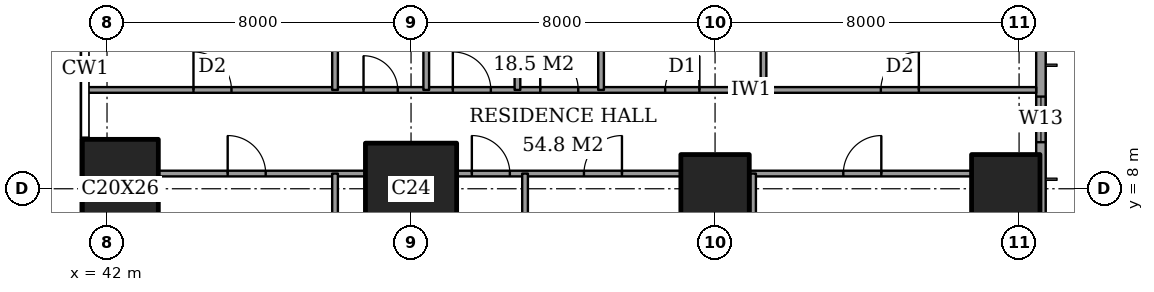
"""IFC4 building model, lengths in metres.
Left out: names, types, materials, properties, quantities, classifications, styles, units other than length and angle.
Written with IfcOpenShell. Run it as: python <this file> out.ifc"""

import sys

from ifc_helpers import new_model, si_unit, direction, frame, frame_2d, origin, origin_2d, place, context, subcontext, project, spatial, rectangle, extrude, element, fill, save


model = new_model("IFC4")
c1 = context("Model", 3, precision=1e-05, world=origin(), true_north=direction((0.0, 1.0)))
c2 = subcontext(c1, "Body", "Model", "MODEL_VIEW")
j1 = project(units=[si_unit("LENGTHUNIT", "METRE"), si_unit("PLANEANGLEUNIT", "RADIAN")], contexts=[c1])
p1 = place(None, origin())
s1 = spatial("IfcSite", under=j1, at=p1, CompositionType="ELEMENT")
p2 = place(p1, origin())
s2 = spatial("IfcBuilding", under=s1, at=p2, CompositionType="ELEMENT")
p3 = place(p2, frame((0.0, 0.0, 196.6)))
s3 = spatial("IfcBuildingStorey", under=s2, at=p3, CompositionType="ELEMENT", Elevation=196.6)
p4 = place(p3, frame((42.35, 8.0, 0.0), z_axis=(0.0, 0.0, 1.0), x_axis=(1.0, 0.0, 0.0)))
e1 = element("IfcColumn", 1, at=p4, inside=s3, PredefinedType="COLUMN", context=c2, shape_type="SweptSolid", body=[
    extrude(rectangle(XDim=2.0, YDim=2.6, at=origin_2d()), origin(), (0.0, 0.0, 1.0), 3.6),
])
p5 = place(p3, frame((50.0, 8.0, 0.0), z_axis=(0.0, 0.0, 1.0), x_axis=(1.0, 0.0, 0.0)))
e2 = element("IfcColumn", 2, at=p5, inside=s3, PredefinedType="COLUMN", context=c2, shape_type="SweptSolid", body=[
    extrude(rectangle(XDim=2.4, YDim=2.4, at=origin_2d()), origin(), (0.0, 0.0, 1.0), 3.6),
])
for number, where, z_axis, x_axis in (
    (3, (58.0, 8.0, 0.0), (0.0, 0.0, 1.0), (1.0, 0.0, 0.0)),
    (4, (65.65, 8.0, 0.0), (0.0, 0.0, 1.0), (1.0, 0.0, 0.0)),
):
    element("IfcColumn", number, at=place(p3, frame(where, z_axis=z_axis, x_axis=x_axis)), inside=s3, PredefinedType="COLUMN", context=c2, shape_type="SweptSolid", body=[
        extrude(rectangle(XDim=1.8, YDim=1.8, at=origin_2d()), origin(), (0.0, 0.0, 1.0), 3.6),
    ])
p6 = place(p3, frame((66.575, 3.175, 0.0), z_axis=(0.0, 0.0, 1.0), x_axis=(0.0, 1.0, 0.0)))
e5 = element("IfcWall", 5, at=p6, inside=s3, PredefinedType="SOLIDWALL", context=c2, shape_type="SweptSolid", body=[
    extrude(rectangle(XDim=41.65, YDim=0.25, at=frame_2d((20.825, 0.0))), origin(), (0.0, 0.0, 1.0), 3.6),
])
p7 = place(p6, frame((0.825, 0.0, 0.2)))
e6 = element("IfcOpeningElement", 6, at=p7, cuts=e5, PredefinedType="OPENING", context=c2, shape_type="SweptSolid", body=[
    extrude(rectangle(XDim=2.4, YDim=2.4, at=frame_2d((1.2, 1.2))), frame((0.0, 0.135, 0.0), z_axis=(0.0, -1.0, 0.0), x_axis=(1.0, 0.0, 0.0)), (0.0, 0.0, 1.0), 0.27),
])
p8 = place(p6, frame((6.05, 0.0, 0.2)))
e7 = element("IfcOpeningElement", 7, at=p8, cuts=e5, PredefinedType="OPENING", context=c2, shape_type="SweptSolid", body=[
    extrude(rectangle(XDim=1.2, YDim=2.4, at=frame_2d((0.6, 1.2))), frame((0.0, 0.135, 0.0), z_axis=(0.0, -1.0, 0.0), x_axis=(1.0, 0.0, 0.0)), (0.0, 0.0, 1.0), 0.27),
])
p9 = place(p6, frame((8.475, 0.0, 0.2)))
e8 = element("IfcOpeningElement", 8, at=p9, cuts=e5, PredefinedType="OPENING", context=c2, shape_type="SweptSolid", body=[
    extrude(rectangle(XDim=2.4, YDim=2.4, at=frame_2d((1.2, 1.2))), frame((0.0, 0.135, 0.0), z_axis=(0.0, -1.0, 0.0), x_axis=(1.0, 0.0, 0.0)), (0.0, 0.0, 1.0), 0.27),
])
p10 = place(p6, frame((15.675, 0.0, 0.2)))
e9 = element("IfcOpeningElement", 9, at=p10, cuts=e5, PredefinedType="OPENING", context=c2, shape_type="SweptSolid", body=[
    extrude(rectangle(XDim=2.4, YDim=2.4, at=frame_2d((1.2, 1.2))), frame((0.0, 0.135, 0.0), z_axis=(0.0, -1.0, 0.0), x_axis=(1.0, 0.0, 0.0)), (0.0, 0.0, 1.0), 0.27),
])
p11 = place(p6, frame((23.625, 0.0, 0.2)))
e10 = element("IfcOpeningElement", 10, at=p11, cuts=e5, PredefinedType="OPENING", context=c2, shape_type="SweptSolid", body=[
    extrude(rectangle(XDim=2.4, YDim=2.4, at=frame_2d((1.2, 1.2))), frame((0.0, 0.135, 0.0), z_axis=(0.0, -1.0, 0.0), x_axis=(1.0, 0.0, 0.0)), (0.0, 0.0, 1.0), 0.27),
])
p12 = place(p6, frame((30.775, 0.0, 0.2)))
e11 = element("IfcOpeningElement", 11, at=p12, cuts=e5, PredefinedType="OPENING", context=c2, shape_type="SweptSolid", body=[
    extrude(rectangle(XDim=2.4, YDim=2.4, at=frame_2d((1.2, 1.2))), frame((0.0, 0.135, 0.0), z_axis=(0.0, -1.0, 0.0), x_axis=(1.0, 0.0, 0.0)), (0.0, 0.0, 1.0), 0.27),
])
p13 = place(p6, frame((34.55, 0.0, 0.2)))
e12 = element("IfcOpeningElement", 12, at=p13, cuts=e5, PredefinedType="OPENING", context=c2, shape_type="SweptSolid", body=[
    extrude(rectangle(XDim=1.2, YDim=2.4, at=frame_2d((0.6, 1.2))), frame((0.0, 0.135, 0.0), z_axis=(0.0, -1.0, 0.0), x_axis=(1.0, 0.0, 0.0)), (0.0, 0.0, 1.0), 0.27),
])
p14 = place(p6, frame((38.425, 0.0, 0.2)))
e13 = element("IfcOpeningElement", 13, at=p14, cuts=e5, PredefinedType="OPENING", context=c2, shape_type="SweptSolid", body=[
    extrude(rectangle(XDim=2.4, YDim=2.4, at=frame_2d((1.2, 1.2))), frame((0.0, 0.135, 0.0), z_axis=(0.0, -1.0, 0.0), x_axis=(1.0, 0.0, 0.0)), (0.0, 0.0, 1.0), 0.27),
])
p15 = place(p3, frame((43.35, 8.4, 0.0), z_axis=(0.0, 0.0, 1.0), x_axis=(1.0, 0.0, 0.0)))
e14 = element("IfcWall", 14, at=p15, inside=s3, PredefinedType="PARTITIONING", context=c2, shape_type="SweptSolid", body=[
    extrude(rectangle(XDim=5.45, YDim=0.15, at=frame_2d((2.725, 0.0))), origin(), (0.0, 0.0, 1.0), 3.35),
])
p16 = place(p15, frame((1.825, 0.0, 0.0)))
e15 = element("IfcOpeningElement", 15, at=p16, cuts=e14, PredefinedType="OPENING", context=c2, shape_type="SweptSolid", body=[
    extrude(rectangle(XDim=1.0, YDim=2.1, at=frame_2d((0.5, 1.05))), frame((0.0, 0.085, 0.0), z_axis=(0.0, -1.0, 0.0), x_axis=(1.0, 0.0, 0.0)), (0.0, 0.0, 1.0), 0.17),
])
p17 = place(p3, frame((51.2, 8.4, 0.0), z_axis=(0.0, 0.0, 1.0), x_axis=(1.0, 0.0, 0.0)))
e16 = element("IfcWall", 16, at=p17, inside=s3, PredefinedType="PARTITIONING", context=c2, shape_type="SweptSolid", body=[
    extrude(rectangle(XDim=5.9, YDim=0.15, at=frame_2d((2.95, 0.0))), origin(), (0.0, 0.0, 1.0), 3.35),
])
p18 = place(p17, frame((3.35, 0.0, 0.0)))
e17 = element("IfcOpeningElement", 17, at=p18, cuts=e16, PredefinedType="OPENING", context=c2, shape_type="SweptSolid", body=[
    extrude(rectangle(XDim=1.0, YDim=2.1, at=frame_2d((0.5, 1.05))), frame((0.0, 0.085, 0.0), z_axis=(0.0, -1.0, 0.0), x_axis=(1.0, 0.0, 0.0)), (0.0, 0.0, 1.0), 0.17),
])
p19 = place(p17, frame((0.4, 0.0, 0.0)))
e18 = element("IfcOpeningElement", 18, at=p19, cuts=e16, PredefinedType="OPENING", context=c2, shape_type="SweptSolid", body=[
    extrude(rectangle(XDim=1.0, YDim=2.1, at=frame_2d((0.5, 1.05))), frame((0.0, 0.085, 0.0), z_axis=(0.0, -1.0, 0.0), x_axis=(1.0, 0.0, 0.0)), (0.0, 0.0, 1.0), 0.17),
])
p20 = place(p3, frame((58.9, 8.4, 0.0), z_axis=(0.0, 0.0, 1.0), x_axis=(1.0, 0.0, 0.0)))
e19 = element("IfcWall", 19, at=p20, inside=s3, PredefinedType="PARTITIONING", context=c2, shape_type="SweptSolid", body=[
    extrude(rectangle(XDim=5.85, YDim=0.15, at=frame_2d((2.925, 0.0))), origin(), (0.0, 0.0, 1.0), 3.35),
])
p21 = place(p20, frame((2.475, 0.0, 0.0)))
e20 = element("IfcOpeningElement", 20, at=p21, cuts=e19, PredefinedType="OPENING", context=c2, shape_type="SweptSolid", body=[
    extrude(rectangle(XDim=1.0, YDim=2.1, at=frame_2d((0.5, 1.05))), frame((0.0, 0.085, 0.0), z_axis=(0.0, -1.0, 0.0), x_axis=(1.0, 0.0, 0.0)), (0.0, 0.0, 1.0), 0.17),
])
p22 = place(p3, frame((41.439, 10.6, 0.0), z_axis=(0.0, 0.0, 1.0), x_axis=(1.0, 0.0, 0.0)))
e21 = element("IfcWall", 21, at=p22, inside=s3, PredefinedType="PARTITIONING", context=c2, shape_type="SweptSolid", body=[
    extrude(rectangle(XDim=25.011, YDim=0.15, at=frame_2d((12.505, 0.0))), origin(), (0.0, 0.0, 1.0), 3.35),
])
p23 = place(p22, frame((11.961, 0.0, 0.0)))
e22 = element("IfcOpeningElement", 22, at=p23, cuts=e21, PredefinedType="OPENING", context=c2, shape_type="SweptSolid", body=[
    extrude(rectangle(XDim=1.0, YDim=2.1, at=frame_2d((0.5, 1.05))), frame((0.0, 0.085, 0.0), z_axis=(0.0, -1.0, 0.0), x_axis=(1.0, 0.0, 0.0)), (0.0, 0.0, 1.0), 0.17),
])
p24 = place(p22, frame((20.924, 0.0, 0.0)))
e23 = element("IfcOpeningElement", 23, at=p24, cuts=e21, PredefinedType="OPENING", context=c2, shape_type="SweptSolid", body=[
    extrude(rectangle(XDim=1.0, YDim=2.1, at=frame_2d((0.5, 1.05))), frame((0.0, 0.085, 0.0), z_axis=(0.0, -1.0, 0.0), x_axis=(1.0, 0.0, 0.0)), (0.0, 0.0, 1.0), 0.17),
])
p25 = place(p22, frame((15.249, 0.0, 0.0)))
e24 = element("IfcOpeningElement", 24, at=p25, cuts=e21, PredefinedType="OPENING", context=c2, shape_type="SweptSolid", body=[
    extrude(rectangle(XDim=0.9, YDim=2.1, at=frame_2d((0.45, 1.05))), frame((0.0, 0.085, 0.0), z_axis=(0.0, -1.0, 0.0), x_axis=(1.0, 0.0, 0.0)), (0.0, 0.0, 1.0), 0.17),
])
p26 = place(p22, frame((9.661, 0.0, 0.0)))
e25 = element("IfcOpeningElement", 25, at=p26, cuts=e21, PredefinedType="OPENING", context=c2, shape_type="SweptSolid", body=[
    extrude(rectangle(XDim=1.0, YDim=2.1, at=frame_2d((0.5, 1.05))), frame((0.0, 0.085, 0.0), z_axis=(0.0, -1.0, 0.0), x_axis=(1.0, 0.0, 0.0)), (0.0, 0.0, 1.0), 0.17),
])
p27 = place(p22, frame((7.311, 0.0, 0.0)))
e26 = element("IfcOpeningElement", 26, at=p27, cuts=e21, PredefinedType="OPENING", context=c2, shape_type="SweptSolid", body=[
    extrude(rectangle(XDim=0.9, YDim=2.1, at=frame_2d((0.45, 1.05))), frame((0.0, 0.085, 0.0), z_axis=(0.0, -1.0, 0.0), x_axis=(1.0, 0.0, 0.0)), (0.0, 0.0, 1.0), 0.17),
])
p28 = place(p22, frame((2.836, 0.0, 0.0)))
e27 = element("IfcOpeningElement", 27, at=p28, cuts=e21, PredefinedType="OPENING", context=c2, shape_type="SweptSolid", body=[
    extrude(rectangle(XDim=1.0, YDim=2.1, at=frame_2d((0.5, 1.05))), frame((0.0, 0.085, 0.0), z_axis=(0.0, -1.0, 0.0), x_axis=(1.0, 0.0, 0.0)), (0.0, 0.0, 1.0), 0.17),
])
p29 = place(p3, frame((48.0, -0.45, 0.0), z_axis=(0.0, 0.0, 1.0), x_axis=(0.0, 1.0, 0.0)))
e28 = element("IfcWall", 28, at=p29, inside=s3, PredefinedType="PARTITIONING", context=c2, shape_type="SweptSolid", body=[
    extrude(rectangle(XDim=8.85, YDim=0.15, at=frame_2d((4.425, 0.0))), origin(), (0.0, 0.0, 1.0), 3.35),
])
p30 = place(p3, frame((48.0, 10.6, 0.0), z_axis=(0.0, 0.0, 1.0), x_axis=(0.0, 1.0, 0.0)))
e29 = element("IfcWall", 29, at=p30, inside=s3, PredefinedType="PARTITIONING", context=c2, shape_type="SweptSolid", body=[
    extrude(rectangle(XDim=8.4, YDim=0.15, at=frame_2d((4.2, 0.0))), origin(), (0.0, 0.0, 1.0), 3.35),
])
p31 = place(p30, frame((6.7, 0.0, 0.0)))
e30 = element("IfcOpeningElement", 30, at=p31, cuts=e29, PredefinedType="OPENING", context=c2, shape_type="SweptSolid", body=[
    extrude(rectangle(XDim=0.9, YDim=2.1, at=frame_2d((0.45, 1.05))), frame((0.0, 0.085, 0.0), z_axis=(0.0, -1.0, 0.0), x_axis=(1.0, 0.0, 0.0)), (0.0, 0.0, 1.0), 0.17),
])
p32 = place(p3, frame((50.4, 10.6, 0.0), z_axis=(0.0, 0.0, 1.0), x_axis=(0.0, 1.0, 0.0)))
e31 = element("IfcWall", 31, at=p32, inside=s3, PredefinedType="PARTITIONING", context=c2, shape_type="SweptSolid", body=[
    extrude(rectangle(XDim=4.2, YDim=0.15, at=frame_2d((2.1, 0.0))), origin(), (0.0, 0.0, 1.0), 3.35),
])
p33 = place(p3, frame((52.8, 10.6, 0.0), z_axis=(0.0, 0.0, 1.0), x_axis=(0.0, 1.0, 0.0)))
e32 = element("IfcWall", 32, at=p33, inside=s3, PredefinedType="PARTITIONING", context=c2, shape_type="SweptSolid", body=[
    extrude(rectangle(XDim=8.4, YDim=0.15, at=frame_2d((4.2, 0.0))), origin(), (0.0, 0.0, 1.0), 3.35),
])
p34 = place(p3, frame((53.0, -0.45, 0.0), z_axis=(0.0, 0.0, 1.0), x_axis=(0.0, 1.0, 0.0)))
e33 = element("IfcWall", 33, at=p34, inside=s3, PredefinedType="PARTITIONING", context=c2, shape_type="SweptSolid", body=[
    extrude(rectangle(XDim=8.85, YDim=0.15, at=frame_2d((4.425, 0.0))), origin(), (0.0, 0.0, 1.0), 3.35),
])
p35 = place(p3, frame((55.0, 10.6, 0.0), z_axis=(0.0, 0.0, 1.0), x_axis=(0.0, 1.0, 0.0)))
e34 = element("IfcWall", 34, at=p35, inside=s3, PredefinedType="PARTITIONING", context=c2, shape_type="SweptSolid", body=[
    extrude(rectangle(XDim=11.0, YDim=0.15, at=frame_2d((5.5, 0.0))), origin(), (0.0, 0.0, 1.0), 3.35),
])
p36 = place(p35, frame((9.2, 0.0, 0.0)))
e35 = element("IfcOpeningElement", 35, at=p36, cuts=e34, PredefinedType="OPENING", context=c2, shape_type="SweptSolid", body=[
    extrude(rectangle(XDim=1.0, YDim=2.1, at=frame_2d((0.5, 1.05))), frame((0.0, 0.085, 0.0), z_axis=(0.0, -1.0, 0.0), x_axis=(1.0, 0.0, 0.0)), (0.0, 0.0, 1.0), 0.17),
])
p37 = place(p3, frame((59.0, -0.45, 0.0), z_axis=(0.0, 0.0, 1.0), x_axis=(0.0, 1.0, 0.0)))
e36 = element("IfcWall", 36, at=p37, inside=s3, PredefinedType="PARTITIONING", context=c2, shape_type="SweptSolid", body=[
    extrude(rectangle(XDim=8.85, YDim=0.15, at=frame_2d((4.425, 0.0))), origin(), (0.0, 0.0, 1.0), 3.35),
])
p38 = place(p3, frame((59.275, 10.6, 0.0), z_axis=(0.0, 0.0, 1.0), x_axis=(0.0, 1.0, 0.0)))
e37 = element("IfcWall", 37, at=p38, inside=s3, PredefinedType="PARTITIONING", context=c2, shape_type="SweptSolid", body=[
    extrude(rectangle(XDim=4.2, YDim=0.15, at=frame_2d((2.1, 0.0))), origin(), (0.0, 0.0, 1.0), 3.35),
])
p39 = place(p8, origin())
e38 = element("IfcWindow", 38, at=p39, inside=s3, PartitioningType="SINGLE_PANEL", PredefinedType="WINDOW", context=c2, shape_type="SweptSolid", body=[
    extrude(rectangle(XDim=1.2, YDim=2.4, at=frame_2d((0.6, 1.2))), frame((0.0, 0.03, 0.0), z_axis=(0.0, -1.0, 0.0), x_axis=(1.0, 0.0, 0.0)), (0.0, 0.0, 1.0), 0.06),
])
fill(e7, e38)
p40 = place(p21, origin())
e39 = element("IfcDoor", 39, at=p40, inside=s3, OperationType="SINGLE_SWING_LEFT", PredefinedType="DOOR", context=c2, shape_type="SweptSolid", body=[
    extrude(rectangle(XDim=1.0, YDim=2.1, at=frame_2d((0.5, 1.05))), frame((0.0, 0.025, 0.0), z_axis=(0.0, -1.0, 0.0), x_axis=(1.0, 0.0, 0.0)), (0.0, 0.0, 1.0), 0.05),
])
fill(e20, e39)
p41 = place(p18, origin())
e40 = element("IfcDoor", 40, at=p41, inside=s3, OperationType="SINGLE_SWING_LEFT", PredefinedType="DOOR", context=c2, shape_type="SweptSolid", body=[
    extrude(rectangle(XDim=1.0, YDim=2.1, at=frame_2d((0.5, 1.05))), frame((0.0, 0.025, 0.0), z_axis=(0.0, -1.0, 0.0), x_axis=(1.0, 0.0, 0.0)), (0.0, 0.0, 1.0), 0.05),
])
fill(e17, e40)
p42 = place(p19, origin())
e41 = element("IfcDoor", 41, at=p42, inside=s3, OperationType="SINGLE_SWING_RIGHT", PredefinedType="DOOR", context=c2, shape_type="SweptSolid", body=[
    extrude(rectangle(XDim=1.0, YDim=2.1, at=frame_2d((0.5, 1.05))), frame((0.0, 0.025, 0.0), z_axis=(0.0, -1.0, 0.0), x_axis=(1.0, 0.0, 0.0)), (0.0, 0.0, 1.0), 0.05),
])
fill(e18, e41)
p43 = place(p16, origin())
e42 = element("IfcDoor", 42, at=p43, inside=s3, OperationType="SINGLE_SWING_RIGHT", PredefinedType="DOOR", context=c2, shape_type="SweptSolid", body=[
    extrude(rectangle(XDim=1.0, YDim=2.1, at=frame_2d((0.5, 1.05))), frame((0.0, 0.025, 0.0), z_axis=(0.0, -1.0, 0.0), x_axis=(1.0, 0.0, 0.0)), (0.0, 0.0, 1.0), 0.05),
])
fill(e15, e42)
p44 = place(p23, origin())
e43 = element("IfcDoor", 43, at=p44, inside=s3, OperationType="SINGLE_SWING_RIGHT", PredefinedType="DOOR", context=c2, shape_type="SweptSolid", body=[
    extrude(rectangle(XDim=1.0, YDim=2.1, at=frame_2d((0.5, 1.05))), frame((0.0, 0.025, 0.0), z_axis=(0.0, -1.0, 0.0), x_axis=(1.0, 0.0, 0.0)), (0.0, 0.0, 1.0), 0.05),
])
fill(e22, e43)
p45 = place(p24, origin())
e44 = element("IfcDoor", 44, at=p45, inside=s3, OperationType="SINGLE_SWING_LEFT", PredefinedType="DOOR", context=c2, shape_type="SweptSolid", body=[
    extrude(rectangle(XDim=1.0, YDim=2.1, at=frame_2d((0.5, 1.05))), frame((0.0, 0.025, 0.0), z_axis=(0.0, -1.0, 0.0), x_axis=(1.0, 0.0, 0.0)), (0.0, 0.0, 1.0), 0.05),
])
fill(e23, e44)
p46 = place(p25, origin())
e45 = element("IfcDoor", 45, at=p46, inside=s3, OperationType="SINGLE_SWING_LEFT", PredefinedType="DOOR", context=c2, shape_type="SweptSolid", body=[
    extrude(rectangle(XDim=0.9, YDim=2.1, at=frame_2d((0.45, 1.05))), frame((0.0, 0.025, 0.0), z_axis=(0.0, -1.0, 0.0), x_axis=(1.0, 0.0, 0.0)), (0.0, 0.0, 1.0), 0.05),
])
fill(e24, e45)
p47 = place(p26, origin())
e46 = element("IfcDoor", 46, at=p47, inside=s3, OperationType="SINGLE_SWING_RIGHT", PredefinedType="DOOR", context=c2, shape_type="SweptSolid", body=[
    extrude(rectangle(XDim=1.0, YDim=2.1, at=frame_2d((0.5, 1.05))), frame((0.0, 0.025, 0.0), z_axis=(0.0, -1.0, 0.0), x_axis=(1.0, 0.0, 0.0)), (0.0, 0.0, 1.0), 0.05),
])
fill(e25, e46)
p48 = place(p27, origin())
e47 = element("IfcDoor", 47, at=p48, inside=s3, OperationType="SINGLE_SWING_RIGHT", PredefinedType="DOOR", context=c2, shape_type="SweptSolid", body=[
    extrude(rectangle(XDim=0.9, YDim=2.1, at=frame_2d((0.45, 1.05))), frame((0.0, 0.025, 0.0), z_axis=(0.0, -1.0, 0.0), x_axis=(1.0, 0.0, 0.0)), (0.0, 0.0, 1.0), 0.05),
])
fill(e26, e47)
p49 = place(p28, origin())
e48 = element("IfcDoor", 48, at=p49, inside=s3, OperationType="SINGLE_SWING_RIGHT", PredefinedType="DOOR", context=c2, shape_type="SweptSolid", body=[
    extrude(rectangle(XDim=1.0, YDim=2.1, at=frame_2d((0.5, 1.05))), frame((0.0, 0.025, 0.0), z_axis=(0.0, -1.0, 0.0), x_axis=(1.0, 0.0, 0.0)), (0.0, 0.0, 1.0), 0.05),
])
fill(e27, e48)
save(model, sys.argv[1])
